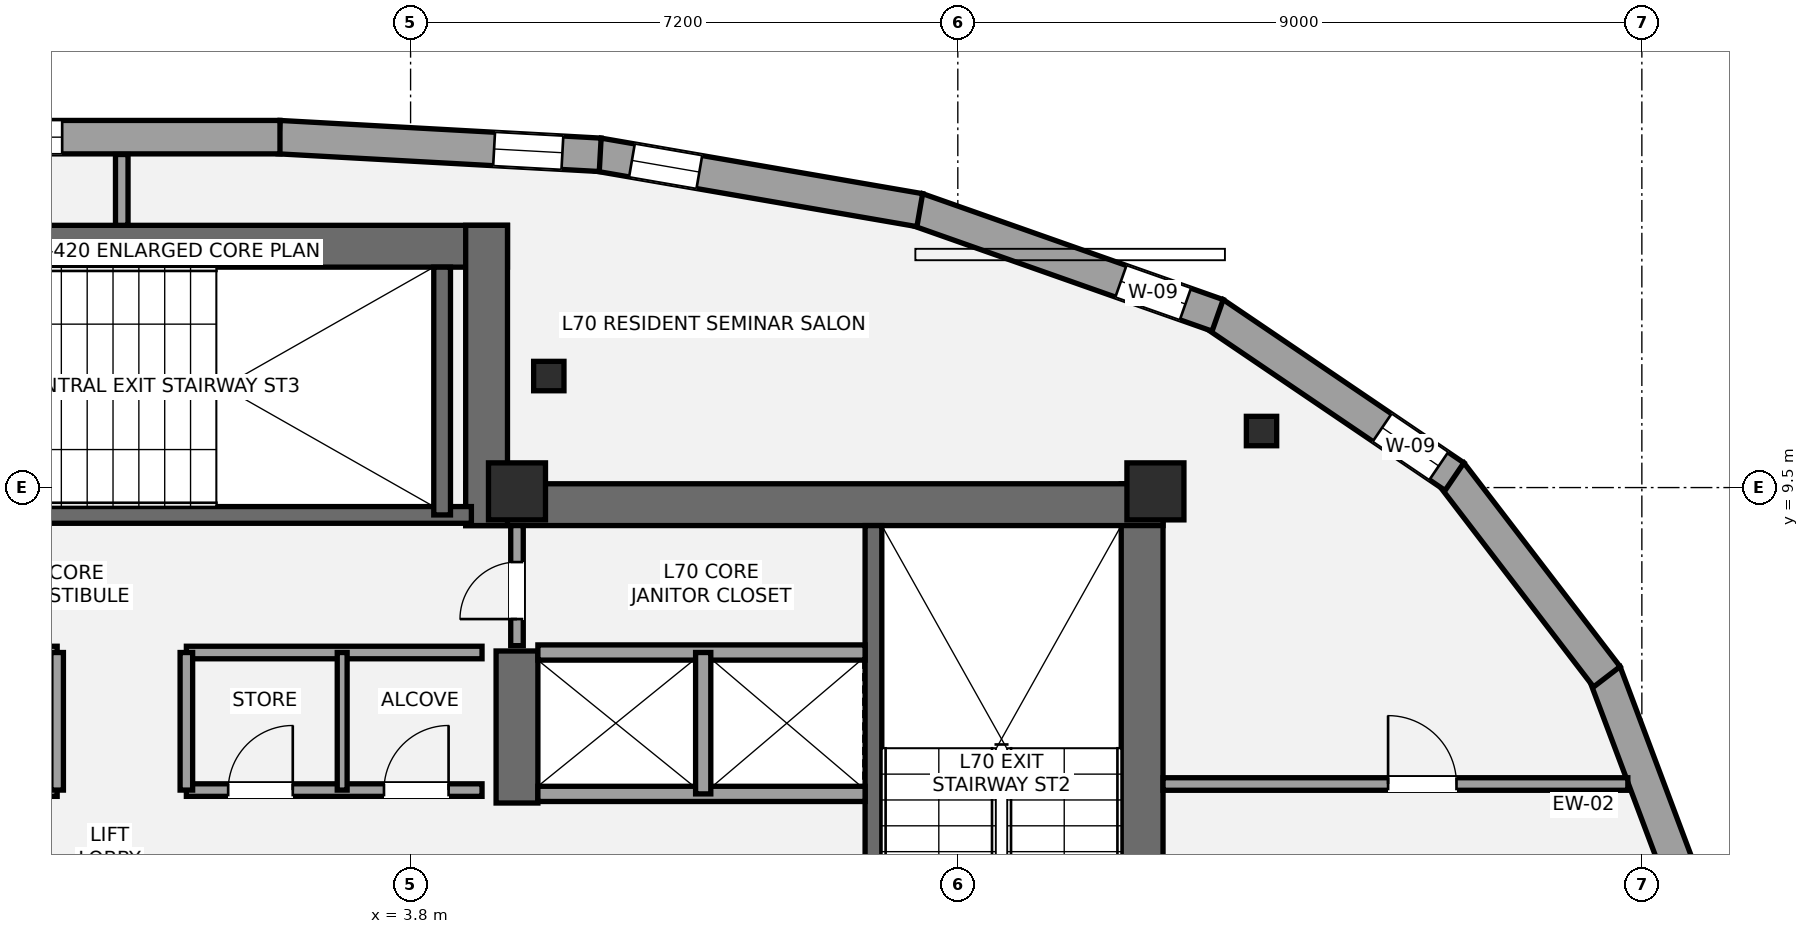
"""IFC4 building model, lengths in metres.
Left out: names, types, materials, properties, quantities, classifications, styles, units other than length and angle.
Written with IfcOpenShell. Run it as: python <this file> out.ifc"""

import sys

from ifc_helpers import new_model, si_unit, direction, frame, frame_2d, origin, origin_2d, place, context, subcontext, project, spatial, rectangle, i_section, extrude, element, fill, save


model = new_model("IFC4")
c1 = context("Model", 3, precision=1e-05, world=origin(), true_north=direction((0.0, 1.0)))
c2 = subcontext(c1, "Body", "Model", "MODEL_VIEW")
j1 = project(units=[si_unit("LENGTHUNIT", "METRE"), si_unit("PLANEANGLEUNIT", "RADIAN")], contexts=[c1])
p1 = place(None, origin())
s1 = spatial("IfcSite", under=j1, at=p1, CompositionType="ELEMENT")
p2 = place(p1, origin())
s2 = spatial("IfcBuilding", under=s1, at=p2, CompositionType="ELEMENT")
p3 = place(p2, frame((0.0, 0.0, 247.8)))
s3 = spatial("IfcBuildingStorey", under=s2, at=p3, CompositionType="ELEMENT", Elevation=247.8)
p4 = place(p3, frame((13.425, 1.3, 0.0), z_axis=(0.0, 0.0, 1.0), x_axis=(0.0, 1.0, 0.0)))
e1 = element("IfcWall", 1, at=p4, inside=s3, PredefinedType="SHEAR", context=c2, shape_type="SweptSolid", body=[
    extrude(rectangle(XDim=8.25, YDim=0.55, at=frame_2d((4.125, 0.0))), origin(), (0.0, 0.0, 1.0), 3.15),
])
p5 = place(p3, frame((4.525, 9.275, 0.0), z_axis=(0.0, 0.0, 1.0), x_axis=(1.0, 0.0, 0.0)))
e2 = element("IfcWall", 2, at=p5, inside=s3, PredefinedType="SHEAR", context=c2, shape_type="SweptSolid", body=[
    extrude(rectangle(XDim=9.175, YDim=0.55, at=frame_2d((4.587, 0.0))), origin(), (0.0, 0.0, 1.0), 3.15),
])
p6 = place(p3, frame((5.2, 5.35, 0.0), z_axis=(0.0, 0.0, 1.0), x_axis=(0.0, 1.0, 0.0)))
e3 = element("IfcWall", 3, at=p6, inside=s3, PredefinedType="SHEAR", context=c2, shape_type="SweptSolid", body=[
    extrude(rectangle(XDim=2.0, YDim=0.55, at=frame_2d((1.0, 0.0))), origin(), (0.0, 0.0, 1.0), 3.15),
])
p7 = place(p3, frame((9.89, 1.85, 0.0), z_axis=(0.0, 0.0, 1.0), x_axis=(0.0, 1.0, 0.0)))
e4 = element("IfcWall", 4, at=p7, inside=s3, PredefinedType="SHEAR", context=c2, shape_type="SweptSolid", body=[
    extrude(rectangle(XDim=7.15, YDim=0.22, at=frame_2d((3.575, 0.0))), origin(), (0.0, 0.0, 1.0), 3.15),
])
p8 = place(p3, frame((-5.075, 12.675, 0.0), z_axis=(0.0, 0.0, 1.0), x_axis=(1.0, 0.0, 0.0)))
e5 = element("IfcWall", 5, at=p8, inside=s3, PredefinedType="SHEAR", context=c2, shape_type="SweptSolid", body=[
    extrude(rectangle(XDim=10.15, YDim=0.55, at=frame_2d((5.075, 0.0))), origin(), (0.0, 0.0, 1.0), 3.15),
])
p9 = place(p3, frame((4.8, 9.0, 0.0), z_axis=(0.0, 0.0, 1.0), x_axis=(0.0, 1.0, 0.0)))
e6 = element("IfcWall", 6, at=p9, inside=s3, PredefinedType="SHEAR", context=c2, shape_type="SweptSolid", body=[
    extrude(rectangle(XDim=3.95, YDim=0.55, at=frame_2d((1.975, 0.0))), origin(), (0.0, 0.0, 1.0), 3.15),
])
p10 = place(p3, frame((-4.7, 9.14, 0.0), z_axis=(0.0, 0.0, 1.0), x_axis=(1.0, 0.0, 0.0)))
e7 = element("IfcWall", 7, at=p10, inside=s3, PredefinedType="SHEAR", context=c2, shape_type="SweptSolid", body=[
    extrude(rectangle(XDim=9.3, YDim=0.22, at=frame_2d((4.65, 0.0))), origin(), (0.0, 0.0, 1.0), 3.15),
])
p11 = place(p10, frame((1.15, 0.0, 0.0)))
e8 = element("IfcOpeningElement", 8, at=p11, cuts=e7, PredefinedType="OPENING", context=c2, shape_type="SweptSolid", body=[
    extrude(rectangle(XDim=1.05, YDim=2.15, at=frame_2d((0.525, 1.075))), frame((0.0, 0.12, 0.0), z_axis=(0.0, -1.0, 0.0), x_axis=(1.0, 0.0, 0.0)), (0.0, 0.0, 1.0), 0.24),
])
p12 = place(p3, frame((4.215, 9.14, 0.0), z_axis=(0.0, 0.0, 1.0), x_axis=(0.0, 1.0, 0.0)))
e9 = element("IfcWall", 9, at=p12, inside=s3, PredefinedType="SHEAR", context=c2, shape_type="SweptSolid", body=[
    extrude(rectangle(XDim=3.26, YDim=0.22, at=frame_2d((1.63, 0.0))), origin(), (0.0, 0.0, 1.0), 3.15),
])
for number, where, z_axis, x_axis in (
    (10, (5.2, 9.45, 0.0), (0.0, 0.0, 1.0), (1.0, 0.0, 0.0)),
    (11, (13.6, 9.45, 0.0), (0.0, 0.0, 1.0), (1.0, 0.0, 0.0)),
):
    element("IfcColumn", number, at=place(p3, frame(where, z_axis=z_axis, x_axis=x_axis)), inside=s3, PredefinedType="PILASTER", context=c2, shape_type="SweptSolid", body=[
        extrude(rectangle(XDim=0.75, YDim=0.75, at=origin_2d()), origin(), (0.0, 0.0, 1.0), 3.15),
    ])
for number, where, z_axis, x_axis in (
    (12, (14.996, 10.244, 0.0), (0.0, 0.0, 1.0), (1.0, 0.0, 0.0)),
    (13, (5.619, 10.967, 0.0), (0.0, 0.0, 1.0), (1.0, 0.0, 0.0)),
):
    element("IfcColumn", number, at=place(p3, frame(where, z_axis=z_axis, x_axis=x_axis)), inside=s3, PredefinedType="COLUMN", context=c2, shape_type="SweptSolid", body=[
        extrude(i_section(OverallWidth=0.399, OverallDepth=0.387, WebThickness=0.021, FlangeThickness=0.033, at=origin_2d()), origin(), (0.0, 0.0, 1.0), 3.15),
    ])
p13 = place(p3, frame((19.508, 7.067, 0.0), z_axis=(0.0, 0.0, 1.0), x_axis=(0.351786989162, -0.936080078976, 0.0)))
e14 = element("IfcWall", 14, at=p13, inside=s3, PredefinedType="STANDARD", context=c2, shape_type="SweptSolid", body=[
    extrude(rectangle(XDim=3.064, YDim=0.44, at=frame_2d((1.532, 0.0))), origin(), (0.0, 0.0, 1.0), 2.336),
])
p14 = place(p3, frame((17.483, 9.692, 0.0), z_axis=(0.0, 0.0, 1.0), x_axis=(0.608417890777, -0.793616828314, 0.0)))
e15 = element("IfcWall", 15, at=p14, inside=s3, PredefinedType="STANDARD", context=c2, shape_type="SweptSolid", body=[
    extrude(rectangle(XDim=3.379, YDim=0.44, at=frame_2d((1.689, 0.0))), origin(), (0.0, 0.0, 1.0), 2.336),
])
p15 = place(p3, frame((14.368, 11.791, 0.0), z_axis=(0.0, 0.0, 1.0), x_axis=(0.827685387822, -0.56119239017, 0.0)))
e16 = element("IfcWall", 16, at=p15, inside=s3, PredefinedType="STANDARD", context=c2, shape_type="SweptSolid", body=[
    extrude(rectangle(XDim=3.826, YDim=0.44, at=frame_2d((1.913, 0.0))), origin(), (0.0, 0.0, 1.0), 2.336),
])
p16 = place(p15, frame((2.676, 0.0, 0.58)))
e17 = element("IfcOpeningElement", 17, at=p16, cuts=e16, PredefinedType="OPENING", context=c2, shape_type="SweptSolid", body=[
    extrude(rectangle(XDim=0.9, YDim=1.35, at=frame_2d((0.45, 0.675))), frame((0.0, 0.23, 0.0), z_axis=(0.0, -1.0, 0.0), x_axis=(1.0, 0.0, 0.0)), (0.0, 0.0, 1.0), 0.46),
])
p17 = place(p3, frame((10.464, 13.159, 0.0), z_axis=(0.0, 0.0, 1.0), x_axis=(0.943128925421, -0.332427180047, 0.0)))
e18 = element("IfcWall", 18, at=p17, inside=s3, PredefinedType="STANDARD", context=c2, shape_type="SweptSolid", body=[
    extrude(rectangle(XDim=4.193, YDim=0.44, at=frame_2d((2.096, 0.0))), origin(), (0.0, 0.0, 1.0), 2.336),
])
p18 = place(p17, frame((2.844, 0.0, 0.58)))
e19 = element("IfcOpeningElement", 19, at=p18, cuts=e18, PredefinedType="OPENING", context=c2, shape_type="SweptSolid", body=[
    extrude(rectangle(XDim=0.9, YDim=1.35, at=frame_2d((0.45, 0.675))), frame((0.0, 0.23, 0.0), z_axis=(0.0, -1.0, 0.0), x_axis=(1.0, 0.0, 0.0)), (0.0, 0.0, 1.0), 0.46),
])
p19 = place(p3, frame((6.27, 13.881, 0.0), z_axis=(0.0, 0.0, 1.0), x_axis=(0.985405225971, -0.170224970641, 0.0)))
e20 = element("IfcWall", 20, at=p19, inside=s3, PredefinedType="STANDARD", context=c2, shape_type="SweptSolid", body=[
    extrude(rectangle(XDim=4.293, YDim=0.44, at=frame_2d((2.146, 0.0))), origin(), (0.0, 0.0, 1.0), 2.336),
])
p20 = place(p19, frame((0.449, 0.0, 0.58)))
e21 = element("IfcOpeningElement", 21, at=p20, cuts=e20, PredefinedType="OPENING", context=c2, shape_type="SweptSolid", body=[
    extrude(rectangle(XDim=0.9, YDim=1.35, at=frame_2d((0.45, 0.675))), frame((0.0, 0.23, 0.0), z_axis=(0.0, -1.0, 0.0), x_axis=(1.0, 0.0, 0.0)), (0.0, 0.0, 1.0), 0.46),
])
p21 = place(p3, frame((2.07, 14.11, 0.0), z_axis=(0.0, 0.0, 1.0), x_axis=(0.998487393463, -0.05498113399, 0.0)))
e22 = element("IfcWall", 22, at=p21, inside=s3, PredefinedType="STANDARD", context=c2, shape_type="SweptSolid", body=[
    extrude(rectangle(XDim=4.232, YDim=0.44, at=frame_2d((2.116, 0.0))), origin(), (0.0, 0.0, 1.0), 2.336),
])
p22 = place(p21, frame((2.833, 0.0, 0.58)))
e23 = element("IfcOpeningElement", 23, at=p22, cuts=e22, PredefinedType="OPENING", context=c2, shape_type="SweptSolid", body=[
    extrude(rectangle(XDim=0.9, YDim=1.35, at=frame_2d((0.45, 0.675))), frame((0.0, 0.23, 0.0), z_axis=(0.0, -1.0, 0.0), x_axis=(1.0, 0.0, 0.0)), (0.0, 0.0, 1.0), 0.46),
])
p23 = place(p3, frame((-2.082, 14.11, 0.0), z_axis=(0.0, 0.0, 1.0), x_axis=(1.0, 0.0, 0.0)))
e24 = element("IfcWall", 24, at=p23, inside=s3, PredefinedType="STANDARD", context=c2, shape_type="SweptSolid", body=[
    extrude(rectangle(XDim=4.163, YDim=0.44, at=frame_2d((2.082, 0.0))), origin(), (0.0, 0.0, 1.0), 2.336),
])
p24 = place(p23, frame((0.397, 0.0, 0.58)))
e25 = element("IfcOpeningElement", 25, at=p24, cuts=e24, PredefinedType="OPENING", context=c2, shape_type="SweptSolid", body=[
    extrude(rectangle(XDim=0.9, YDim=1.35, at=frame_2d((0.45, 0.675))), frame((0.0, 0.23, 0.0), z_axis=(0.0, -1.0, 0.0), x_axis=(1.0, 0.0, 0.0)), (0.0, 0.0, 1.0), 0.46),
])
for number, where, z_axis, x_axis in (
    (26, (5.475, 5.47, 0.0), (0.0, 0.0, 1.0), (1.0, 0.0, 0.0)),
    (27, (5.475, 7.33, 0.0), (0.0, 0.0, 1.0), (1.0, 0.0, 0.0)),
):
    element("IfcWall", number, at=place(p3, frame(where, z_axis=z_axis, x_axis=x_axis)), inside=s3, PredefinedType="SOLIDWALL", context=c2, shape_type="SweptSolid", body=[
        extrude(rectangle(XDim=4.305, YDim=0.2, at=frame_2d((2.152, 0.0))), origin(), (0.0, 0.0, 1.0), 2.97),
    ])
p25 = place(p3, frame((7.65, 5.47, 0.0), z_axis=(0.0, 0.0, 1.0), x_axis=(0.0, 1.0, 0.0)))
e28 = element("IfcWall", 28, at=p25, inside=s3, PredefinedType="SOLIDWALL", context=c2, shape_type="SweptSolid", body=[
    extrude(rectangle(XDim=1.86, YDim=0.2, at=frame_2d((0.93, 0.0))), origin(), (0.0, 0.0, 1.0), 2.97),
])
p26 = place(p3, frame((-4.74, 5.52, 0.0), z_axis=(0.0, 0.0, 1.0), x_axis=(1.0, 0.0, 0.0)))
e29 = element("IfcWall", 29, at=p26, inside=s3, PredefinedType="PARTITIONING", context=c2, shape_type="SweptSolid", body=[
    extrude(rectangle(XDim=3.89, YDim=0.165, at=frame_2d((1.945, 0.0))), origin(), (0.0, 0.0, 1.0), 2.97),
])
p27 = place(p26, frame((1.6, 0.0, 0.0)))
e30 = element("IfcOpeningElement", 30, at=p27, cuts=e29, PredefinedType="OPENING", context=c2, shape_type="SweptSolid", body=[
    extrude(rectangle(XDim=0.85, YDim=2.1, at=frame_2d((0.425, 1.05))), frame((0.0, 0.093, 0.0), z_axis=(0.0, -1.0, 0.0), x_axis=(1.0, 0.0, 0.0)), (0.0, 0.0, 1.0), 0.185),
])
p28 = place(p3, frame((-4.74, 7.33, 0.0), z_axis=(0.0, 0.0, 1.0), x_axis=(1.0, 0.0, 0.0)))
e31 = element("IfcWall", 31, at=p28, inside=s3, PredefinedType="PARTITIONING", context=c2, shape_type="SweptSolid", body=[
    extrude(rectangle(XDim=3.89, YDim=0.165, at=frame_2d((1.945, 0.0))), origin(), (0.0, 0.0, 1.0), 2.97),
])
p29 = place(p3, frame((-0.85, 5.52, 0.0), z_axis=(0.0, 0.0, 1.0), x_axis=(0.0, 1.0, 0.0)))
e32 = element("IfcWall", 32, at=p29, inside=s3, PredefinedType="PARTITIONING", context=c2, shape_type="SweptSolid", body=[
    extrude(rectangle(XDim=1.81, YDim=0.165, at=frame_2d((0.905, 0.0))), origin(), (0.0, 0.0, 1.0), 2.97),
])
p30 = place(p3, frame((0.85, 5.52, 0.0), z_axis=(0.0, 0.0, 1.0), x_axis=(1.0, 0.0, 0.0)))
e33 = element("IfcWall", 33, at=p30, inside=s3, PredefinedType="PARTITIONING", context=c2, shape_type="SweptSolid", body=[
    extrude(rectangle(XDim=3.89, YDim=0.165, at=frame_2d((1.945, 0.0))), origin(), (0.0, 0.0, 1.0), 2.97),
])
p31 = place(p30, frame((0.55, 0.0, 0.0)))
e34 = element("IfcOpeningElement", 34, at=p31, cuts=e33, PredefinedType="OPENING", context=c2, shape_type="SweptSolid", body=[
    extrude(rectangle(XDim=0.85, YDim=2.1, at=frame_2d((0.425, 1.05))), frame((0.0, 0.093, 0.0), z_axis=(0.0, -1.0, 0.0), x_axis=(1.0, 0.0, 0.0)), (0.0, 0.0, 1.0), 0.185),
])
p32 = place(p30, frame((2.6, 0.0, 0.0)))
e35 = element("IfcOpeningElement", 35, at=p32, cuts=e33, PredefinedType="OPENING", context=c2, shape_type="SweptSolid", body=[
    extrude(rectangle(XDim=0.85, YDim=2.1, at=frame_2d((0.425, 1.05))), frame((0.0, 0.093, 0.0), z_axis=(0.0, -1.0, 0.0), x_axis=(1.0, 0.0, 0.0)), (0.0, 0.0, 1.0), 0.185),
])
p33 = place(p3, frame((0.85, 7.33, 0.0), z_axis=(0.0, 0.0, 1.0), x_axis=(1.0, 0.0, 0.0)))
e36 = element("IfcWall", 36, at=p33, inside=s3, PredefinedType="PARTITIONING", context=c2, shape_type="SweptSolid", body=[
    extrude(rectangle(XDim=3.89, YDim=0.165, at=frame_2d((1.945, 0.0))), origin(), (0.0, 0.0, 1.0), 2.97),
])
p34 = place(p3, frame((0.85, 5.52, 0.0), z_axis=(0.0, 0.0, 1.0), x_axis=(0.0, 1.0, 0.0)))
e37 = element("IfcWall", 37, at=p34, inside=s3, PredefinedType="PARTITIONING", context=c2, shape_type="SweptSolid", body=[
    extrude(rectangle(XDim=1.81, YDim=0.165, at=frame_2d((0.905, 0.0))), origin(), (0.0, 0.0, 1.0), 2.97),
])
p35 = place(p3, frame((2.9, 5.52, 0.0), z_axis=(0.0, 0.0, 1.0), x_axis=(0.0, 1.0, 0.0)))
e38 = element("IfcWall", 38, at=p35, inside=s3, PredefinedType="PARTITIONING", context=c2, shape_type="SweptSolid", body=[
    extrude(rectangle(XDim=1.81, YDim=0.13, at=frame_2d((0.905, 0.0))), origin(), (0.0, 0.0, 1.0), 2.97),
])
p36 = place(p3, frame((5.2, 7.42, 0.0), z_axis=(0.0, 0.0, 1.0), x_axis=(0.0, 1.0, 0.0)))
e39 = element("IfcWall", 39, at=p36, inside=s3, PredefinedType="PARTITIONING", context=c2, shape_type="SweptSolid", body=[
    extrude(rectangle(XDim=1.58, YDim=0.165, at=frame_2d((0.79, 0.0))), origin(), (0.0, 0.0, 1.0), 2.97),
])
p37 = place(p36, frame((0.35, 0.0, 0.0)))
e40 = element("IfcOpeningElement", 40, at=p37, cuts=e39, PredefinedType="OPENING", context=c2, shape_type="SweptSolid", body=[
    extrude(rectangle(XDim=0.75, YDim=2.1, at=frame_2d((0.375, 1.05))), frame((0.0, 0.093, 0.0), z_axis=(0.0, -1.0, 0.0), x_axis=(1.0, 0.0, 0.0)), (0.0, 0.0, 1.0), 0.185),
])
p38 = place(p3, frame((0.0, 12.95, 0.0), z_axis=(0.0, 0.0, 1.0), x_axis=(0.0, 1.0, 0.0)))
e41 = element("IfcWall", 41, at=p38, inside=s3, PredefinedType="PARTITIONING", context=c2, shape_type="SweptSolid", body=[
    extrude(rectangle(XDim=0.932, YDim=0.165, at=frame_2d((0.466, 0.0))), origin(), (0.0, 0.0, 1.0), 2.97),
])
p39 = place(p3, frame((13.7, 5.6, 0.0), z_axis=(0.0, 0.0, 1.0), x_axis=(1.0, 0.0, 0.0)))
e42 = element("IfcWall", 42, at=p39, inside=s3, PredefinedType="PARTITIONING", context=c2, shape_type="SweptSolid", body=[
    extrude(rectangle(XDim=6.115, YDim=0.165, at=frame_2d((3.058, 0.0))), origin(), (0.0, 0.0, 1.0), 2.423),
])
p40 = place(p39, frame((2.961, 0.0, 0.0)))
e43 = element("IfcOpeningElement", 43, at=p40, cuts=e42, PredefinedType="OPENING", context=c2, shape_type="SweptSolid", body=[
    extrude(rectangle(XDim=0.9, YDim=2.1, at=frame_2d((0.45, 1.05))), frame((0.0, 0.093, 0.0), z_axis=(0.0, -1.0, 0.0), x_axis=(1.0, 0.0, 0.0)), (0.0, 0.0, 1.0), 0.185),
])
p41 = place(p16, origin())
e44 = element("IfcWindow", 44, at=p41, inside=s3, PartitioningType="SINGLE_PANEL", PredefinedType="WINDOW", context=c2, shape_type="SweptSolid", body=[
    extrude(rectangle(XDim=0.9, YDim=1.35, at=frame_2d((0.45, 0.675))), frame((0.0, -0.01, 0.0), z_axis=(0.0, -1.0, 0.0), x_axis=(1.0, 0.0, 0.0)), (0.0, 0.0, 1.0), 0.06),
])
fill(e17, e44)
p42 = place(p18, origin())
e45 = element("IfcWindow", 45, at=p42, inside=s3, PartitioningType="SINGLE_PANEL", PredefinedType="WINDOW", context=c2, shape_type="SweptSolid", body=[
    extrude(rectangle(XDim=0.9, YDim=1.35, at=frame_2d((0.45, 0.675))), frame((0.0, -0.01, 0.0), z_axis=(0.0, -1.0, 0.0), x_axis=(1.0, 0.0, 0.0)), (0.0, 0.0, 1.0), 0.06),
])
fill(e19, e45)
p43 = place(p20, origin())
e46 = element("IfcWindow", 46, at=p43, inside=s3, PartitioningType="SINGLE_PANEL", PredefinedType="WINDOW", context=c2, shape_type="SweptSolid", body=[
    extrude(rectangle(XDim=0.9, YDim=1.35, at=frame_2d((0.45, 0.675))), frame((0.0, -0.01, 0.0), z_axis=(0.0, -1.0, 0.0), x_axis=(1.0, 0.0, 0.0)), (0.0, 0.0, 1.0), 0.06),
])
fill(e21, e46)
p44 = place(p22, origin())
e47 = element("IfcWindow", 47, at=p44, inside=s3, PartitioningType="SINGLE_PANEL", PredefinedType="WINDOW", context=c2, shape_type="SweptSolid", body=[
    extrude(rectangle(XDim=0.9, YDim=1.35, at=frame_2d((0.45, 0.675))), frame((0.0, -0.01, 0.0), z_axis=(0.0, -1.0, 0.0), x_axis=(1.0, 0.0, 0.0)), (0.0, 0.0, 1.0), 0.06),
])
fill(e23, e47)
p45 = place(p24, origin())
e48 = element("IfcWindow", 48, at=p45, inside=s3, PartitioningType="SINGLE_PANEL", PredefinedType="WINDOW", context=c2, shape_type="SweptSolid", body=[
    extrude(rectangle(XDim=0.9, YDim=1.35, at=frame_2d((0.45, 0.675))), frame((0.0, -0.01, 0.0), z_axis=(0.0, -1.0, 0.0), x_axis=(1.0, 0.0, 0.0)), (0.0, 0.0, 1.0), 0.06),
])
fill(e25, e48)
p46 = place(p31, origin())
e49 = element("IfcDoor", 49, at=p46, inside=s3, OperationType="SINGLE_SWING_RIGHT", PredefinedType="DOOR", context=c2, shape_type="SweptSolid", body=[
    extrude(rectangle(XDim=0.85, YDim=2.1, at=frame_2d((0.425, 1.05))), frame((0.0, 0.025, 0.0), z_axis=(0.0, -1.0, 0.0), x_axis=(1.0, 0.0, 0.0)), (0.0, 0.0, 1.0), 0.05),
])
fill(e34, e49)
p47 = place(p32, origin())
e50 = element("IfcDoor", 50, at=p47, inside=s3, OperationType="SINGLE_SWING_RIGHT", PredefinedType="DOOR", context=c2, shape_type="SweptSolid", body=[
    extrude(rectangle(XDim=0.85, YDim=2.1, at=frame_2d((0.425, 1.05))), frame((0.0, 0.025, 0.0), z_axis=(0.0, -1.0, 0.0), x_axis=(1.0, 0.0, 0.0)), (0.0, 0.0, 1.0), 0.05),
])
fill(e35, e50)
p48 = place(p37, origin())
e51 = element("IfcDoor", 51, at=p48, inside=s3, OperationType="SINGLE_SWING_LEFT", PredefinedType="DOOR", context=c2, shape_type="SweptSolid", body=[
    extrude(rectangle(XDim=0.75, YDim=2.1, at=frame_2d((0.375, 1.05))), frame((0.0, 0.025, 0.0), z_axis=(0.0, -1.0, 0.0), x_axis=(1.0, 0.0, 0.0)), (0.0, 0.0, 1.0), 0.05),
])
fill(e40, e51)
p49 = place(p40, origin())
e52 = element("IfcDoor", 52, at=p49, inside=s3, OperationType="SINGLE_SWING_LEFT", PredefinedType="DOOR", context=c2, shape_type="SweptSolid", body=[
    extrude(rectangle(XDim=0.9, YDim=2.1, at=frame_2d((0.45, 1.05))), frame((0.0, 0.025, 0.0), z_axis=(0.0, -1.0, 0.0), x_axis=(1.0, 0.0, 0.0)), (0.0, 0.0, 1.0), 0.05),
])
fill(e43, e52)
save(model, sys.argv[1])
